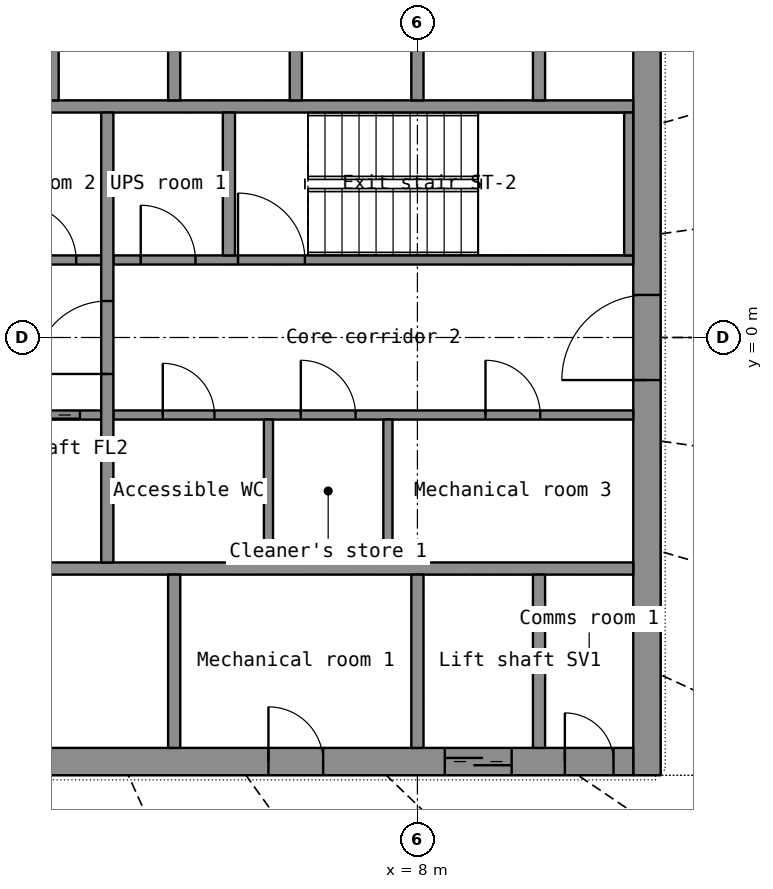
"""IFC4 building model, lengths in metres.
Left out: names, types, materials, properties, quantities, classifications, styles, units other than length and angle.
Written with IfcOpenShell. Run it as: python <this file> out.ifc"""

import sys

from ifc_helpers import new_model, si_unit, direction, frame, frame_2d, origin, place, context, subcontext, project, spatial, rectangle, extrude, element, fill, save


model = new_model("IFC4")
c1 = context("Model", 3, precision=1e-05, world=origin(), true_north=direction((0.0, 1.0)))
c2 = subcontext(c1, "Body", "Model", "MODEL_VIEW")
j1 = project(units=[si_unit("LENGTHUNIT", "METRE"), si_unit("PLANEANGLEUNIT", "RADIAN")], contexts=[c1])
p1 = place(None, origin())
s1 = spatial("IfcSite", under=j1, at=p1, CompositionType="ELEMENT")
p2 = place(p1, origin())
s2 = spatial("IfcBuilding", under=s1, at=p2, CompositionType="ELEMENT")
p3 = place(p2, frame((0.0, 0.0, 171.9)))
s3 = spatial("IfcBuildingStorey", under=s2, at=p3, CompositionType="ELEMENT", Elevation=171.9)
p4 = place(p3, frame((11.775, -7.2, 0.0), z_axis=(0.0, 0.0, 1.0), x_axis=(0.0, 1.0, 0.0)))
e1 = element("IfcWall", 1, at=p4, inside=s3, PredefinedType="SHEAR", context=c2, shape_type="SweptSolid", body=[
    extrude(rectangle(XDim=14.4, YDim=0.45, at=frame_2d((7.2, 0.0))), origin(), (0.0, 0.0, 1.0), 3.3),
])
p5 = place(p4, frame((6.5, 0.0, 0.0)))
e2 = element("IfcOpeningElement", 2, at=p5, cuts=e1, PredefinedType="OPENING", context=c2, shape_type="SweptSolid", body=[
    extrude(rectangle(XDim=1.4, YDim=2.2, at=frame_2d((0.7, 1.1))), frame((0.0, 0.235, 0.0), z_axis=(0.0, -1.0, 0.0), x_axis=(1.0, 0.0, 0.0)), (0.0, 0.0, 1.0), 0.47),
])
p6 = place(p3, frame((-11.55, -6.975, 0.0), z_axis=(0.0, 0.0, 1.0), x_axis=(1.0, 0.0, 0.0)))
e3 = element("IfcWall", 3, at=p6, inside=s3, PredefinedType="SHEAR", context=c2, shape_type="SweptSolid", body=[
    extrude(rectangle(XDim=23.1, YDim=0.45, at=frame_2d((11.55, 0.0))), origin(), (0.0, 0.0, 1.0), 3.3),
])
p7 = place(p6, frame((20.0, 0.0, 0.0)))
e4 = element("IfcOpeningElement", 4, at=p7, cuts=e3, PredefinedType="OPENING", context=c2, shape_type="SweptSolid", body=[
    extrude(rectangle(XDim=1.1, YDim=2.2, at=frame_2d((0.55, 1.1))), frame((0.0, 0.235, 0.0), z_axis=(0.0, -1.0, 0.0), x_axis=(1.0, 0.0, 0.0)), (0.0, 0.0, 1.0), 0.47),
])
p8 = place(p6, frame((4.1, 0.0, 0.0)))
e5 = element("IfcOpeningElement", 5, at=p8, cuts=e3, PredefinedType="OPENING", context=c2, shape_type="SweptSolid", body=[
    extrude(rectangle(XDim=0.9, YDim=2.1, at=frame_2d((0.45, 1.05))), frame((0.0, 0.235, 0.0), z_axis=(0.0, -1.0, 0.0), x_axis=(1.0, 0.0, 0.0)), (0.0, 0.0, 1.0), 0.47),
])
p9 = place(p6, frame((11.1, 0.0, 0.0)))
e6 = element("IfcOpeningElement", 6, at=p9, cuts=e3, PredefinedType="OPENING", context=c2, shape_type="SweptSolid", body=[
    extrude(rectangle(XDim=0.9, YDim=2.1, at=frame_2d((0.45, 1.05))), frame((0.0, 0.235, 0.0), z_axis=(0.0, -1.0, 0.0), x_axis=(1.0, 0.0, 0.0)), (0.0, 0.0, 1.0), 0.47),
])
p10 = place(p6, frame((17.1, 0.0, 0.0)))
e7 = element("IfcOpeningElement", 7, at=p10, cuts=e3, PredefinedType="OPENING", context=c2, shape_type="SweptSolid", body=[
    extrude(rectangle(XDim=0.9, YDim=2.1, at=frame_2d((0.45, 1.05))), frame((0.0, 0.235, 0.0), z_axis=(0.0, -1.0, 0.0), x_axis=(1.0, 0.0, 0.0)), (0.0, 0.0, 1.0), 0.47),
])
p11 = place(p6, frame((0.325, 0.0, 0.0)))
e8 = element("IfcOpeningElement", 8, at=p11, cuts=e3, PredefinedType="OPENING", context=c2, shape_type="SweptSolid", body=[
    extrude(rectangle(XDim=0.8, YDim=2.05, at=frame_2d((0.4, 1.025))), frame((0.0, 0.235, 0.0), z_axis=(0.0, -1.0, 0.0), x_axis=(1.0, 0.0, 0.0)), (0.0, 0.0, 1.0), 0.47),
])
p12 = place(p6, frame((21.975, 0.0, 0.0)))
e9 = element("IfcOpeningElement", 9, at=p12, cuts=e3, PredefinedType="OPENING", context=c2, shape_type="SweptSolid", body=[
    extrude(rectangle(XDim=0.8, YDim=2.05, at=frame_2d((0.4, 1.025))), frame((0.0, 0.235, 0.0), z_axis=(0.0, -1.0, 0.0), x_axis=(1.0, 0.0, 0.0)), (0.0, 0.0, 1.0), 0.47),
])
for number, where, z_axis, x_axis in (
    (10, (-11.55, -3.8, 0.0), (0.0, 0.0, 1.0), (1.0, 0.0, 0.0)),
    (11, (-11.55, 3.8, 0.0), (0.0, 0.0, 1.0), (1.0, 0.0, 0.0)),
):
    element("IfcWall", number, at=place(p3, frame(where, z_axis=z_axis, x_axis=x_axis)), inside=s3, PredefinedType="SHEAR", context=c2, shape_type="SweptSolid", body=[
        extrude(rectangle(XDim=23.1, YDim=0.2, at=frame_2d((11.55, 0.0))), origin(), (0.0, 0.0, 1.0), 3.3),
    ])
for number, where, z_axis, x_axis in (
    (12, (8.0, -6.75, 0.0), (0.0, 0.0, 1.0), (0.0, 1.0, 0.0)),
    (13, (10.0, -6.75, 0.0), (0.0, 0.0, 1.0), (0.0, 1.0, 0.0)),
):
    element("IfcWall", number, at=place(p3, frame(where, z_axis=z_axis, x_axis=x_axis)), inside=s3, PredefinedType="SHEAR", context=c2, shape_type="SweptSolid", body=[
        extrude(rectangle(XDim=2.85, YDim=0.2, at=frame_2d((1.425, 0.0))), origin(), (0.0, 0.0, 1.0), 3.3),
    ])
p13 = place(p3, frame((4.0, -6.75, 0.0), z_axis=(0.0, 0.0, 1.0), x_axis=(0.0, 1.0, 0.0)))
e14 = element("IfcWall", 14, at=p13, inside=s3, PredefinedType="PARTITIONING", context=c2, shape_type="SweptSolid", body=[
    extrude(rectangle(XDim=2.85, YDim=0.2, at=frame_2d((1.425, 0.0))), origin(), (0.0, 0.0, 1.0), 3.3),
])
for number, where, z_axis, x_axis in (
    (15, (2.0, 3.9, 0.0), (0.0, 0.0, 1.0), (0.0, 1.0, 0.0)),
    (16, (4.0, 3.9, 0.0), (0.0, 0.0, 1.0), (0.0, 1.0, 0.0)),
    (17, (6.0, 3.9, 0.0), (0.0, 0.0, 1.0), (0.0, 1.0, 0.0)),
    (18, (8.0, 3.9, 0.0), (0.0, 0.0, 1.0), (0.0, 1.0, 0.0)),
    (19, (10.0, 3.9, 0.0), (0.0, 0.0, 1.0), (0.0, 1.0, 0.0)),
):
    element("IfcWall", number, at=place(p3, frame(where, z_axis=z_axis, x_axis=x_axis)), inside=s3, PredefinedType="SHEAR", context=c2, shape_type="SweptSolid", body=[
        extrude(rectangle(XDim=2.85, YDim=0.2, at=frame_2d((1.425, 0.0))), origin(), (0.0, 0.0, 1.0), 3.3),
    ])
p14 = place(p3, frame((-2.8, -1.275, 0.0), z_axis=(0.0, 0.0, 1.0), x_axis=(1.0, 0.0, 0.0)))
e20 = element("IfcWall", 20, at=p14, inside=s3, PredefinedType="SHEAR", context=c2, shape_type="SweptSolid", body=[
    extrude(rectangle(XDim=5.6, YDim=0.15, at=frame_2d((2.8, 0.0))), origin(), (0.0, 0.0, 1.0), 3.3),
])
p15 = place(p14, frame((4.15, 0.0, 0.0)))
e21 = element("IfcOpeningElement", 21, at=p15, cuts=e20, PredefinedType="OPENING", context=c2, shape_type="SweptSolid", body=[
    extrude(rectangle(XDim=1.1, YDim=2.2, at=frame_2d((0.55, 1.1))), frame((0.0, 0.085, 0.0), z_axis=(0.0, -1.0, 0.0), x_axis=(1.0, 0.0, 0.0)), (0.0, 0.0, 1.0), 0.17),
])
p16 = place(p14, frame((0.499, 0.0, 0.0)))
e22 = element("IfcOpeningElement", 22, at=p16, cuts=e20, PredefinedType="OPENING", context=c2, shape_type="SweptSolid", body=[
    extrude(rectangle(XDim=0.9, YDim=2.1, at=frame_2d((0.45, 1.05))), frame((0.0, 0.085, 0.0), z_axis=(0.0, -1.0, 0.0), x_axis=(1.0, 0.0, 0.0)), (0.0, 0.0, 1.0), 0.17),
])
p17 = place(p14, frame((2.374, 0.0, 0.0)))
e23 = element("IfcOpeningElement", 23, at=p17, cuts=e20, PredefinedType="OPENING", context=c2, shape_type="SweptSolid", body=[
    extrude(rectangle(XDim=0.9, YDim=2.1, at=frame_2d((0.45, 1.05))), frame((0.0, 0.085, 0.0), z_axis=(0.0, -1.0, 0.0), x_axis=(1.0, 0.0, 0.0)), (0.0, 0.0, 1.0), 0.17),
])
p18 = place(p3, frame((3.0, -1.275, 0.0), z_axis=(0.0, 0.0, 1.0), x_axis=(1.0, 0.0, 0.0)))
e24 = element("IfcWall", 24, at=p18, inside=s3, PredefinedType="PARTITIONING", context=c2, shape_type="SweptSolid", body=[
    extrude(rectangle(XDim=8.55, YDim=0.15, at=frame_2d((4.275, 0.0))), origin(), (0.0, 0.0, 1.0), 3.3),
])
p19 = place(p18, frame((0.812, 0.0, 0.0)))
e25 = element("IfcOpeningElement", 25, at=p19, cuts=e24, PredefinedType="OPENING", context=c2, shape_type="SweptSolid", body=[
    extrude(rectangle(XDim=0.85, YDim=2.1, at=frame_2d((0.425, 1.05))), frame((0.0, 0.085, 0.0), z_axis=(0.0, -1.0, 0.0), x_axis=(1.0, 0.0, 0.0)), (0.0, 0.0, 1.0), 0.17),
])
p20 = place(p18, frame((3.083, 0.0, 0.0)))
e26 = element("IfcOpeningElement", 26, at=p20, cuts=e24, PredefinedType="OPENING", context=c2, shape_type="SweptSolid", body=[
    extrude(rectangle(XDim=0.9, YDim=2.1, at=frame_2d((0.45, 1.05))), frame((0.0, 0.085, 0.0), z_axis=(0.0, -1.0, 0.0), x_axis=(1.0, 0.0, 0.0)), (0.0, 0.0, 1.0), 0.17),
])
p21 = place(p18, frame((6.12, 0.0, 0.0)))
e27 = element("IfcOpeningElement", 27, at=p21, cuts=e24, PredefinedType="OPENING", context=c2, shape_type="SweptSolid", body=[
    extrude(rectangle(XDim=0.9, YDim=2.1, at=frame_2d((0.45, 1.05))), frame((0.0, 0.085, 0.0), z_axis=(0.0, -1.0, 0.0), x_axis=(1.0, 0.0, 0.0)), (0.0, 0.0, 1.0), 0.17),
])
p22 = place(p3, frame((-2.8, 1.275, 0.0), z_axis=(0.0, 0.0, 1.0), x_axis=(1.0, 0.0, 0.0)))
e28 = element("IfcWall", 28, at=p22, inside=s3, PredefinedType="SHEAR", context=c2, shape_type="SweptSolid", body=[
    extrude(rectangle(XDim=5.6, YDim=0.15, at=frame_2d((2.8, 0.0))), origin(), (0.0, 0.0, 1.0), 3.3),
])
p23 = place(p22, frame((0.35, 0.0, 0.0)))
e29 = element("IfcOpeningElement", 29, at=p23, cuts=e28, PredefinedType="OPENING", context=c2, shape_type="SweptSolid", body=[
    extrude(rectangle(XDim=1.1, YDim=2.2, at=frame_2d((0.55, 1.1))), frame((0.0, 0.085, 0.0), z_axis=(0.0, -1.0, 0.0), x_axis=(1.0, 0.0, 0.0)), (0.0, 0.0, 1.0), 0.17),
])
p24 = place(p22, frame((2.413, 0.0, 0.0)))
e30 = element("IfcOpeningElement", 30, at=p24, cuts=e28, PredefinedType="OPENING", context=c2, shape_type="SweptSolid", body=[
    extrude(rectangle(XDim=0.9, YDim=2.1, at=frame_2d((0.45, 1.05))), frame((0.0, 0.085, 0.0), z_axis=(0.0, -1.0, 0.0), x_axis=(1.0, 0.0, 0.0)), (0.0, 0.0, 1.0), 0.17),
])
p25 = place(p22, frame((4.288, 0.0, 0.0)))
e31 = element("IfcOpeningElement", 31, at=p25, cuts=e28, PredefinedType="OPENING", context=c2, shape_type="SweptSolid", body=[
    extrude(rectangle(XDim=0.9, YDim=2.1, at=frame_2d((0.45, 1.05))), frame((0.0, 0.085, 0.0), z_axis=(0.0, -1.0, 0.0), x_axis=(1.0, 0.0, 0.0)), (0.0, 0.0, 1.0), 0.17),
])
p26 = place(p3, frame((3.0, 1.275, 0.0), z_axis=(0.0, 0.0, 1.0), x_axis=(1.0, 0.0, 0.0)))
e32 = element("IfcWall", 32, at=p26, inside=s3, PredefinedType="SHEAR", context=c2, shape_type="SweptSolid", body=[
    extrude(rectangle(XDim=8.55, YDim=0.15, at=frame_2d((4.275, 0.0))), origin(), (0.0, 0.0, 1.0), 3.3),
])
p27 = place(p26, frame((2.05, 0.0, 0.0)))
e33 = element("IfcOpeningElement", 33, at=p27, cuts=e32, PredefinedType="OPENING", context=c2, shape_type="SweptSolid", body=[
    extrude(rectangle(XDim=1.1, YDim=2.15, at=frame_2d((0.55, 1.075))), frame((0.0, 0.085, 0.0), z_axis=(0.0, -1.0, 0.0), x_axis=(1.0, 0.0, 0.0)), (0.0, 0.0, 1.0), 0.17),
])
p28 = place(p26, frame((0.45, 0.0, 0.0)))
e34 = element("IfcOpeningElement", 34, at=p28, cuts=e32, PredefinedType="OPENING", context=c2, shape_type="SweptSolid", body=[
    extrude(rectangle(XDim=0.9, YDim=2.1, at=frame_2d((0.45, 1.05))), frame((0.0, 0.085, 0.0), z_axis=(0.0, -1.0, 0.0), x_axis=(1.0, 0.0, 0.0)), (0.0, 0.0, 1.0), 0.17),
])
p29 = place(p3, frame((2.9, -3.7, 0.0), z_axis=(0.0, 0.0, 1.0), x_axis=(0.0, 1.0, 0.0)))
e35 = element("IfcWall", 35, at=p29, inside=s3, PredefinedType="SHEAR", context=c2, shape_type="SweptSolid", body=[
    extrude(rectangle(XDim=7.4, YDim=0.2, at=frame_2d((3.7, 0.0))), origin(), (0.0, 0.0, 1.0), 3.3),
])
p30 = place(p29, frame((3.1, 0.0, 0.0)))
e36 = element("IfcOpeningElement", 36, at=p30, cuts=e35, PredefinedType="OPENING", context=c2, shape_type="SweptSolid", body=[
    extrude(rectangle(XDim=1.2, YDim=2.2, at=frame_2d((0.6, 1.1))), frame((0.0, 0.11, 0.0), z_axis=(0.0, -1.0, 0.0), x_axis=(1.0, 0.0, 0.0)), (0.0, 0.0, 1.0), 0.22),
])
p31 = place(p3, frame((11.475, 1.35, 0.0), z_axis=(0.0, 0.0, 1.0), x_axis=(0.0, 1.0, 0.0)))
e37 = element("IfcWall", 37, at=p31, inside=s3, PredefinedType="SHEAR", context=c2, shape_type="SweptSolid", body=[
    extrude(rectangle(XDim=2.35, YDim=0.15, at=frame_2d((1.175, 0.0))), origin(), (0.0, 0.0, 1.0), 3.3),
])
p32 = place(p3, frame((4.9, 1.35, 0.0), z_axis=(0.0, 0.0, 1.0), x_axis=(0.0, 1.0, 0.0)))
e38 = element("IfcWall", 38, at=p32, inside=s3, PredefinedType="SHEAR", context=c2, shape_type="SweptSolid", body=[
    extrude(rectangle(XDim=2.35, YDim=0.2, at=frame_2d((1.175, 0.0))), origin(), (0.0, 0.0, 1.0), 3.3),
])
for number, where, z_axis, x_axis in (
    (39, (5.55, -3.7, 0.0), (0.0, 0.0, 1.0), (0.0, 1.0, 0.0)),
    (40, (7.515, -3.7, 0.0), (0.0, 0.0, 1.0), (0.0, 1.0, 0.0)),
):
    element("IfcWall", number, at=place(p3, frame(where, z_axis=z_axis, x_axis=x_axis)), inside=s3, PredefinedType="PARTITIONING", context=c2, shape_type="SweptSolid", body=[
        extrude(rectangle(XDim=2.35, YDim=0.15, at=frame_2d((1.175, 0.0))), origin(), (0.0, 0.0, 1.0), 3.3),
    ])
p33 = place(p7, origin())
e41 = element("IfcDoor", 41, at=p33, inside=s3, OperationType="DOUBLE_DOOR_SLIDING", PredefinedType="DOOR", context=c2, shape_type="SweptSolid", body=[
    extrude(rectangle(XDim=1.1, YDim=2.2, at=frame_2d((0.55, 1.1))), frame((0.0, 0.025, 0.0), z_axis=(0.0, -1.0, 0.0), x_axis=(1.0, 0.0, 0.0)), (0.0, 0.0, 1.0), 0.05),
])
fill(e4, e41)
p34 = place(p10, origin())
e42 = element("IfcDoor", 42, at=p34, inside=s3, OperationType="SINGLE_SWING_LEFT", PredefinedType="DOOR", context=c2, shape_type="SweptSolid", body=[
    extrude(rectangle(XDim=0.9, YDim=2.1, at=frame_2d((0.45, 1.05))), frame((0.0, 0.025, 0.0), z_axis=(0.0, -1.0, 0.0), x_axis=(1.0, 0.0, 0.0)), (0.0, 0.0, 1.0), 0.05),
])
fill(e7, e42)
p35 = place(p12, origin())
e43 = element("IfcDoor", 43, at=p35, inside=s3, OperationType="SINGLE_SWING_LEFT", PredefinedType="DOOR", context=c2, shape_type="SweptSolid", body=[
    extrude(rectangle(XDim=0.8, YDim=2.05, at=frame_2d((0.4, 1.025))), frame((0.0, 0.025, 0.0), z_axis=(0.0, -1.0, 0.0), x_axis=(1.0, 0.0, 0.0)), (0.0, 0.0, 1.0), 0.05),
])
fill(e9, e43)
p36 = place(p5, origin())
e44 = element("IfcDoor", 44, at=p36, inside=s3, OperationType="DOUBLE_DOOR_SINGLE_SWING", PredefinedType="DOOR", context=c2, shape_type="SweptSolid", body=[
    extrude(rectangle(XDim=1.4, YDim=2.2, at=frame_2d((0.7, 1.1))), frame((0.0, 0.025, 0.0), z_axis=(0.0, -1.0, 0.0), x_axis=(1.0, 0.0, 0.0)), (0.0, 0.0, 1.0), 0.05),
])
fill(e2, e44)
p37 = place(p30, origin())
e45 = element("IfcDoor", 45, at=p37, inside=s3, OperationType="SINGLE_SWING_LEFT", PredefinedType="DOOR", context=c2, shape_type="SweptSolid", body=[
    extrude(rectangle(XDim=1.2, YDim=2.2, at=frame_2d((0.6, 1.1))), frame((0.0, 0.025, 0.0), z_axis=(0.0, -1.0, 0.0), x_axis=(1.0, 0.0, 0.0)), (0.0, 0.0, 1.0), 0.05),
])
fill(e36, e45)
p38 = place(p15, origin())
e46 = element("IfcDoor", 46, at=p38, inside=s3, OperationType="DOUBLE_DOOR_SLIDING", PredefinedType="DOOR", context=c2, shape_type="SweptSolid", body=[
    extrude(rectangle(XDim=1.1, YDim=2.2, at=frame_2d((0.55, 1.1))), frame((0.0, 0.025, 0.0), z_axis=(0.0, -1.0, 0.0), x_axis=(1.0, 0.0, 0.0)), (0.0, 0.0, 1.0), 0.05),
])
fill(e21, e46)
p39 = place(p27, origin())
e47 = element("IfcDoor", 47, at=p39, inside=s3, OperationType="SINGLE_SWING_LEFT", PredefinedType="DOOR", context=c2, shape_type="SweptSolid", body=[
    extrude(rectangle(XDim=1.1, YDim=2.15, at=frame_2d((0.55, 1.075))), frame((0.0, 0.025, 0.0), z_axis=(0.0, -1.0, 0.0), x_axis=(1.0, 0.0, 0.0)), (0.0, 0.0, 1.0), 0.05),
])
fill(e33, e47)
p40 = place(p19, origin())
e48 = element("IfcDoor", 48, at=p40, inside=s3, OperationType="SINGLE_SWING_LEFT", PredefinedType="DOOR", context=c2, shape_type="SweptSolid", body=[
    extrude(rectangle(XDim=0.85, YDim=2.1, at=frame_2d((0.425, 1.05))), frame((0.0, 0.025, 0.0), z_axis=(0.0, -1.0, 0.0), x_axis=(1.0, 0.0, 0.0)), (0.0, 0.0, 1.0), 0.05),
])
fill(e25, e48)
p41 = place(p20, origin())
e49 = element("IfcDoor", 49, at=p41, inside=s3, OperationType="SINGLE_SWING_LEFT", PredefinedType="DOOR", context=c2, shape_type="SweptSolid", body=[
    extrude(rectangle(XDim=0.9, YDim=2.1, at=frame_2d((0.45, 1.05))), frame((0.0, 0.025, 0.0), z_axis=(0.0, -1.0, 0.0), x_axis=(1.0, 0.0, 0.0)), (0.0, 0.0, 1.0), 0.05),
])
fill(e26, e49)
p42 = place(p21, origin())
e50 = element("IfcDoor", 50, at=p42, inside=s3, OperationType="SINGLE_SWING_LEFT", PredefinedType="DOOR", context=c2, shape_type="SweptSolid", body=[
    extrude(rectangle(XDim=0.9, YDim=2.1, at=frame_2d((0.45, 1.05))), frame((0.0, 0.025, 0.0), z_axis=(0.0, -1.0, 0.0), x_axis=(1.0, 0.0, 0.0)), (0.0, 0.0, 1.0), 0.05),
])
fill(e27, e50)
p43 = place(p25, origin())
e51 = element("IfcDoor", 51, at=p43, inside=s3, OperationType="SINGLE_SWING_LEFT", PredefinedType="DOOR", context=c2, shape_type="SweptSolid", body=[
    extrude(rectangle(XDim=0.9, YDim=2.1, at=frame_2d((0.45, 1.05))), frame((0.0, 0.025, 0.0), z_axis=(0.0, -1.0, 0.0), x_axis=(1.0, 0.0, 0.0)), (0.0, 0.0, 1.0), 0.05),
])
fill(e31, e51)
p44 = place(p28, origin())
e52 = element("IfcDoor", 52, at=p44, inside=s3, OperationType="SINGLE_SWING_LEFT", PredefinedType="DOOR", context=c2, shape_type="SweptSolid", body=[
    extrude(rectangle(XDim=0.9, YDim=2.1, at=frame_2d((0.45, 1.05))), frame((0.0, 0.025, 0.0), z_axis=(0.0, -1.0, 0.0), x_axis=(1.0, 0.0, 0.0)), (0.0, 0.0, 1.0), 0.05),
])
fill(e34, e52)
save(model, sys.argv[1])
